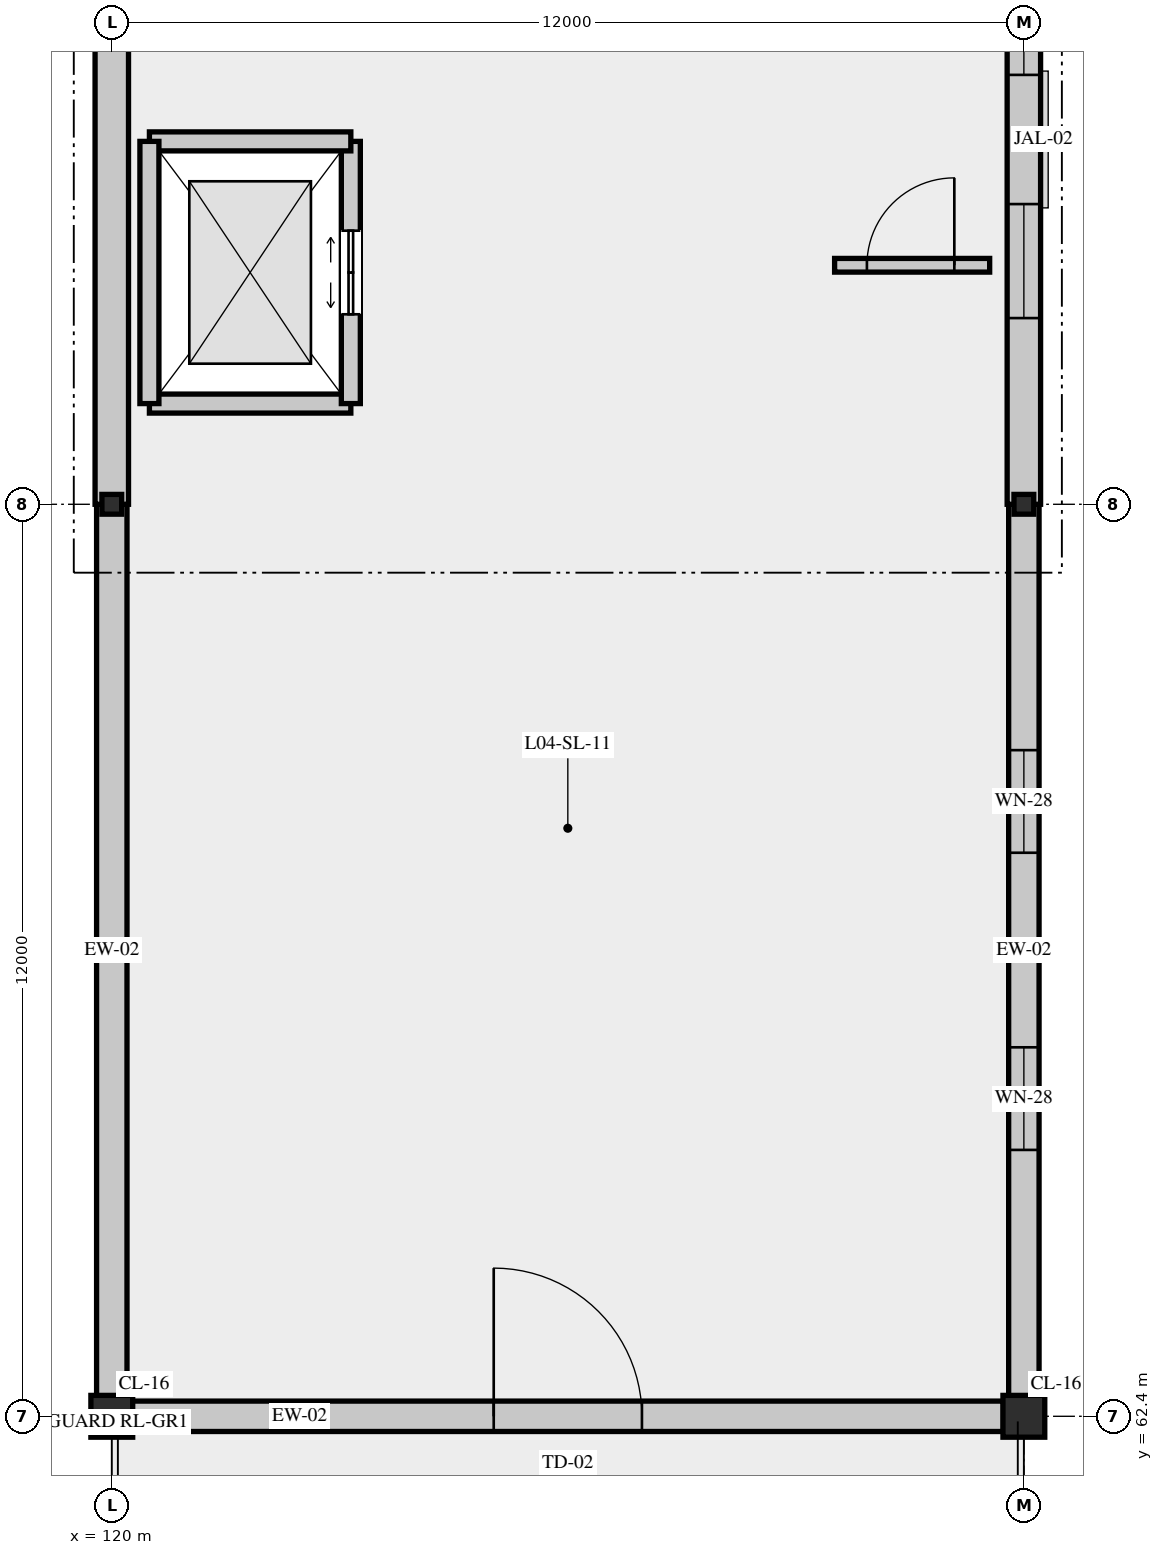
"""IFC4 building model, lengths in metres.
Left out: names, types, materials, properties, quantities, classifications, styles, units other than length and angle.
Written with IfcOpenShell. Run it as: python <this file> out.ifc"""

import sys

from ifc_helpers import new_model, si_unit, direction, frame, frame_2d, origin, origin_2d, place, context, subcontext, project, spatial, rectangle, i_section, extrude, element, fill, save


model = new_model("IFC4")
c1 = context("Model", 3, precision=1e-05, world=origin(), true_north=direction((0.0, 1.0)))
c2 = subcontext(c1, "Body", "Model", "MODEL_VIEW")
j1 = project(units=[si_unit("LENGTHUNIT", "METRE"), si_unit("PLANEANGLEUNIT", "RADIAN")], contexts=[c1])
p1 = place(None, origin())
s1 = spatial("IfcSite", under=j1, at=p1, CompositionType="ELEMENT")
p2 = place(p1, origin())
s2 = spatial("IfcBuilding", under=s1, at=p2, CompositionType="ELEMENT")
p3 = place(p2, frame((0.0, 0.0, 23.4)))
s3 = spatial("IfcBuildingStorey", under=s2, at=p3, CompositionType="ELEMENT", Elevation=23.4)
p4 = place(p3, frame((120.0, 62.4, 0.0), z_axis=(0.0, 0.0, 1.0), x_axis=(1.0, 0.0, 0.0)))
e1 = element("IfcColumn", 1, at=p4, inside=s3, PredefinedType="COLUMN", context=c2, shape_type="SweptSolid", body=[
    extrude(rectangle(XDim=0.55, YDim=0.55, at=origin_2d()), origin(), (0.0, 0.0, 1.0), 4.8),
])
p5 = place(p3, frame((120.0, 74.4, 0.0), z_axis=(0.0, 0.0, 1.0), x_axis=(1.0, 0.0, 0.0)))
e2 = element("IfcColumn", 2, at=p5, inside=s3, PredefinedType="COLUMN", context=c2, shape_type="SweptSolid", body=[
    extrude(i_section(OverallWidth=0.26, OverallDepth=0.26, WebThickness=0.01, FlangeThickness=0.018, FilletRadius=0.024, at=origin_2d()), origin(), (0.0, 0.0, 1.0), 4.8),
])
p6 = place(p3, frame((132.0, 62.4, 0.0), z_axis=(0.0, 0.0, 1.0), x_axis=(1.0, 0.0, 0.0)))
e3 = element("IfcColumn", 3, at=p6, inside=s3, PredefinedType="COLUMN", context=c2, shape_type="SweptSolid", body=[
    extrude(rectangle(XDim=0.55, YDim=0.55, at=origin_2d()), origin(), (0.0, 0.0, 1.0), 4.8),
])
p7 = place(p3, frame((132.0, 74.4, 0.0), z_axis=(0.0, 0.0, 1.0), x_axis=(1.0, 0.0, 0.0)))
e4 = element("IfcColumn", 4, at=p7, inside=s3, PredefinedType="COLUMN", context=c2, shape_type="SweptSolid", body=[
    extrude(i_section(OverallWidth=0.26, OverallDepth=0.26, WebThickness=0.01, FlangeThickness=0.018, FilletRadius=0.024, at=origin_2d()), origin(), (0.0, 0.0, 1.0), 4.8),
])
p8 = place(p3, frame((120.27, 62.4, 0.0), z_axis=(0.0, 0.0, 1.0), x_axis=(1.0, 0.0, 0.0)))
e5 = element("IfcWall", 5, at=p8, inside=s3, PredefinedType="SOLIDWALL", context=c2, shape_type="SweptSolid", body=[
    extrude(rectangle(XDim=11.46, YDim=0.4, at=frame_2d((5.73, 0.0))), origin(), (0.0, 0.0, 1.0), 3.98),
])
p9 = place(p8, frame((4.755, 0.0, 0.0)))
e6 = element("IfcOpeningElement", 6, at=p9, cuts=e5, PredefinedType="OPENING", context=c2, shape_type="SweptSolid", body=[
    extrude(rectangle(XDim=1.95, YDim=2.35, at=frame_2d((0.975, 1.175))), frame((0.0, 0.21, 0.0), z_axis=(0.0, -1.0, 0.0), x_axis=(1.0, 0.0, 0.0)), (0.0, 0.0, 1.0), 0.42),
])
p10 = place(p3, frame((120.0, 74.4, 0.0), z_axis=(0.0, 0.0, 1.0), x_axis=(0.0, -1.0, 0.0)))
e7 = element("IfcWall", 7, at=p10, inside=s3, PredefinedType="SOLIDWALL", context=c2, shape_type="SweptSolid", body=[
    extrude(rectangle(XDim=11.73, YDim=0.4, at=frame_2d((5.865, 0.0))), origin(), (0.0, 0.0, 1.0), 3.98),
])
p11 = place(p3, frame((132.0, 62.67, 0.0), z_axis=(0.0, 0.0, 1.0), x_axis=(0.0, 1.0, 0.0)))
e8 = element("IfcWall", 8, at=p11, inside=s3, PredefinedType="SOLIDWALL", context=c2, shape_type="SweptSolid", body=[
    extrude(rectangle(XDim=11.73, YDim=0.4, at=frame_2d((5.865, 0.0))), origin(), (0.0, 0.0, 1.0), 3.98),
])
p12 = place(p11, frame((3.235, 0.0, 0.95)))
e9 = element("IfcOpeningElement", 9, at=p12, cuts=e8, PredefinedType="OPENING", context=c2, shape_type="SweptSolid", body=[
    extrude(rectangle(XDim=1.35, YDim=2.1, at=frame_2d((0.675, 1.05))), frame((0.0, 0.21, 0.0), z_axis=(0.0, -1.0, 0.0), x_axis=(1.0, 0.0, 0.0)), (0.0, 0.0, 1.0), 0.42),
])
p13 = place(p11, frame((7.145, 0.0, 0.95)))
e10 = element("IfcOpeningElement", 10, at=p13, cuts=e8, PredefinedType="OPENING", context=c2, shape_type="SweptSolid", body=[
    extrude(rectangle(XDim=1.35, YDim=2.1, at=frame_2d((0.675, 1.05))), frame((0.0, 0.21, 0.0), z_axis=(0.0, -1.0, 0.0), x_axis=(1.0, 0.0, 0.0)), (0.0, 0.0, 1.0), 0.42),
])
p14 = place(p3, frame((120.0, 84.0, 0.0), z_axis=(0.0, 0.0, 1.0), x_axis=(0.0, -1.0, 0.0)))
e11 = element("IfcWall", 11, at=p14, inside=s3, PredefinedType="SOLIDWALL", context=c2, shape_type="SweptSolid", body=[
    extrude(rectangle(XDim=9.6, YDim=0.44, at=frame_2d((4.8, 0.0))), origin(), (0.0, 0.0, 1.0), 3.98),
])
p15 = place(p3, frame((132.0, 74.4, 0.0), z_axis=(0.0, 0.0, 1.0), x_axis=(0.0, 1.0, 0.0)))
e12 = element("IfcWall", 12, at=p15, inside=s3, PredefinedType="SOLIDWALL", context=c2, shape_type="SweptSolid", body=[
    extrude(rectangle(XDim=9.6, YDim=0.44, at=frame_2d((4.8, 0.0))), origin(), (0.0, 0.0, 1.0), 3.98),
])
p16 = place(p15, frame((2.45, 0.0, 0.95)))
e13 = element("IfcOpeningElement", 13, at=p16, cuts=e12, PredefinedType="OPENING", context=c2, shape_type="SweptSolid", body=[
    extrude(rectangle(XDim=1.5, YDim=2.1, at=frame_2d((0.75, 1.05))), frame((0.0, 0.23, 0.0), z_axis=(0.0, -1.0, 0.0), x_axis=(1.0, 0.0, 0.0)), (0.0, 0.0, 1.0), 0.46),
])
p17 = place(p15, frame((5.65, 0.0, 0.95)))
e14 = element("IfcOpeningElement", 14, at=p17, cuts=e12, PredefinedType="OPENING", context=c2, shape_type="SweptSolid", body=[
    extrude(rectangle(XDim=1.5, YDim=2.1, at=frame_2d((0.75, 1.05))), frame((0.0, 0.23, 0.0), z_axis=(0.0, -1.0, 0.0), x_axis=(1.0, 0.0, 0.0)), (0.0, 0.0, 1.0), 0.46),
])
p18 = place(p3, frame((120.495, 75.725, 0.0), z_axis=(0.0, 0.0, 1.0), x_axis=(1.0, 0.0, 0.0)))
e15 = element("IfcWall", 15, at=p18, inside=s3, PredefinedType="SOLIDWALL", context=c2, shape_type="SweptSolid", body=[
    extrude(rectangle(XDim=2.65, YDim=0.25, at=frame_2d((1.325, 0.0))), origin(), (0.0, 0.0, 1.0), 4.54),
])
p19 = place(p3, frame((123.145, 75.725, 0.0), z_axis=(0.0, 0.0, 1.0), x_axis=(0.0, 1.0, 0.0)))
e16 = element("IfcWall", 16, at=p19, inside=s3, PredefinedType="SOLIDWALL", context=c2, shape_type="SweptSolid", body=[
    extrude(rectangle(XDim=3.45, YDim=0.25, at=frame_2d((1.725, 0.0))), origin(), (0.0, 0.0, 1.0), 4.54),
])
p20 = place(p19, frame((1.175, 0.0, 0.0)))
e17 = element("IfcOpeningElement", 17, at=p20, cuts=e16, PredefinedType="OPENING", context=c2, shape_type="SweptSolid", body=[
    extrude(rectangle(XDim=1.1, YDim=2.2, at=frame_2d((0.55, 1.1))), frame((0.0, 0.135, 0.0), z_axis=(0.0, -1.0, 0.0), x_axis=(1.0, 0.0, 0.0)), (0.0, 0.0, 1.0), 0.27),
])
p21 = place(p3, frame((123.145, 79.175, 0.0), z_axis=(0.0, 0.0, 1.0), x_axis=(-1.0, 0.0, 0.0)))
e18 = element("IfcWall", 18, at=p21, inside=s3, PredefinedType="SOLIDWALL", context=c2, shape_type="SweptSolid", body=[
    extrude(rectangle(XDim=2.65, YDim=0.25, at=frame_2d((1.325, 0.0))), origin(), (0.0, 0.0, 1.0), 4.54),
])
p22 = place(p3, frame((120.495, 79.175, 0.0), z_axis=(0.0, 0.0, 1.0), x_axis=(0.0, -1.0, 0.0)))
e19 = element("IfcWall", 19, at=p22, inside=s3, PredefinedType="SOLIDWALL", context=c2, shape_type="SweptSolid", body=[
    extrude(rectangle(XDim=3.45, YDim=0.25, at=frame_2d((1.725, 0.0))), origin(), (0.0, 0.0, 1.0), 4.54),
])
p23 = place(p3, frame((129.51, 77.545, 0.0), z_axis=(0.0, 0.0, 1.0), x_axis=(1.0, 0.0, 0.0)))
e20 = element("IfcWall", 20, at=p23, inside=s3, PredefinedType="PARTITIONING", context=c2, shape_type="SweptSolid", body=[
    extrude(rectangle(XDim=2.04, YDim=0.18, at=frame_2d((1.02, 0.0))), origin(), (0.0, 0.0, 1.0), 4.18),
])
p24 = place(p23, frame((0.425, 0.0, 0.0)))
e21 = element("IfcOpeningElement", 21, at=p24, cuts=e20, PredefinedType="OPENING", context=c2, shape_type="SweptSolid", body=[
    extrude(rectangle(XDim=1.15, YDim=2.25, at=frame_2d((0.575, 1.125))), frame((0.0, 0.1, 0.0), z_axis=(0.0, -1.0, 0.0), x_axis=(1.0, 0.0, 0.0)), (0.0, 0.0, 1.0), 0.2),
])
p25 = place(p9, origin())
e22 = element("IfcDoor", 22, at=p25, inside=s3, OperationType="DOUBLE_DOOR_SINGLE_SWING", PredefinedType="DOOR", context=c2, shape_type="SweptSolid", body=[
    extrude(rectangle(XDim=1.95, YDim=2.35, at=frame_2d((0.975, 1.175))), frame((0.0, 0.025, 0.0), z_axis=(0.0, -1.0, 0.0), x_axis=(1.0, 0.0, 0.0)), (0.0, 0.0, 1.0), 0.05),
])
fill(e6, e22)
p26 = place(p12, origin())
e23 = element("IfcWindow", 23, at=p26, inside=s3, PartitioningType="SINGLE_PANEL", PredefinedType="WINDOW", context=c2, shape_type="SweptSolid", body=[
    extrude(rectangle(XDim=1.35, YDim=2.1, at=frame_2d((0.675, 1.05))), frame((0.0, 0.03, 0.0), z_axis=(0.0, -1.0, 0.0), x_axis=(1.0, 0.0, 0.0)), (0.0, 0.0, 1.0), 0.06),
])
fill(e9, e23)
p27 = place(p13, origin())
e24 = element("IfcWindow", 24, at=p27, inside=s3, PartitioningType="SINGLE_PANEL", PredefinedType="WINDOW", context=c2, shape_type="SweptSolid", body=[
    extrude(rectangle(XDim=1.35, YDim=2.1, at=frame_2d((0.675, 1.05))), frame((0.0, 0.03, 0.0), z_axis=(0.0, -1.0, 0.0), x_axis=(1.0, 0.0, 0.0)), (0.0, 0.0, 1.0), 0.06),
])
fill(e10, e24)
p28 = place(p16, origin())
e25 = element("IfcWindow", 25, at=p28, inside=s3, PartitioningType="SINGLE_PANEL", PredefinedType="WINDOW", context=c2, shape_type="SweptSolid", body=[
    extrude(rectangle(XDim=1.5, YDim=2.1, at=frame_2d((0.75, 1.05))), frame((0.0, 0.03, 0.0), z_axis=(0.0, -1.0, 0.0), x_axis=(1.0, 0.0, 0.0)), (0.0, 0.0, 1.0), 0.06),
])
fill(e13, e25)
p29 = place(p17, origin())
e26 = element("IfcWindow", 26, at=p29, inside=s3, PartitioningType="SINGLE_PANEL", PredefinedType="WINDOW", context=c2, shape_type="SweptSolid", body=[
    extrude(rectangle(XDim=1.5, YDim=2.1, at=frame_2d((0.75, 1.05))), frame((0.0, 0.03, 0.0), z_axis=(0.0, -1.0, 0.0), x_axis=(1.0, 0.0, 0.0)), (0.0, 0.0, 1.0), 0.06),
])
fill(e14, e26)
p30 = place(p20, origin())
e27 = element("IfcDoor", 27, at=p30, inside=s3, OperationType="SLIDING_TO_LEFT", PredefinedType="DOOR", context=c2, shape_type="SweptSolid", body=[
    extrude(rectangle(XDim=1.1, YDim=2.2, at=frame_2d((0.55, 1.1))), frame((0.0, 0.025, 0.0), z_axis=(0.0, -1.0, 0.0), x_axis=(1.0, 0.0, 0.0)), (0.0, 0.0, 1.0), 0.05),
])
fill(e17, e27)
p31 = place(p24, origin())
e28 = element("IfcDoor", 28, at=p31, inside=s3, OperationType="SINGLE_SWING_RIGHT", PredefinedType="DOOR", context=c2, shape_type="SweptSolid", body=[
    extrude(rectangle(XDim=1.15, YDim=2.25, at=frame_2d((0.575, 1.125))), frame((0.0, 0.025, 0.0), z_axis=(0.0, -1.0, 0.0), x_axis=(1.0, 0.0, 0.0)), (0.0, 0.0, 1.0), 0.05),
])
fill(e21, e28)
save(model, sys.argv[1])
